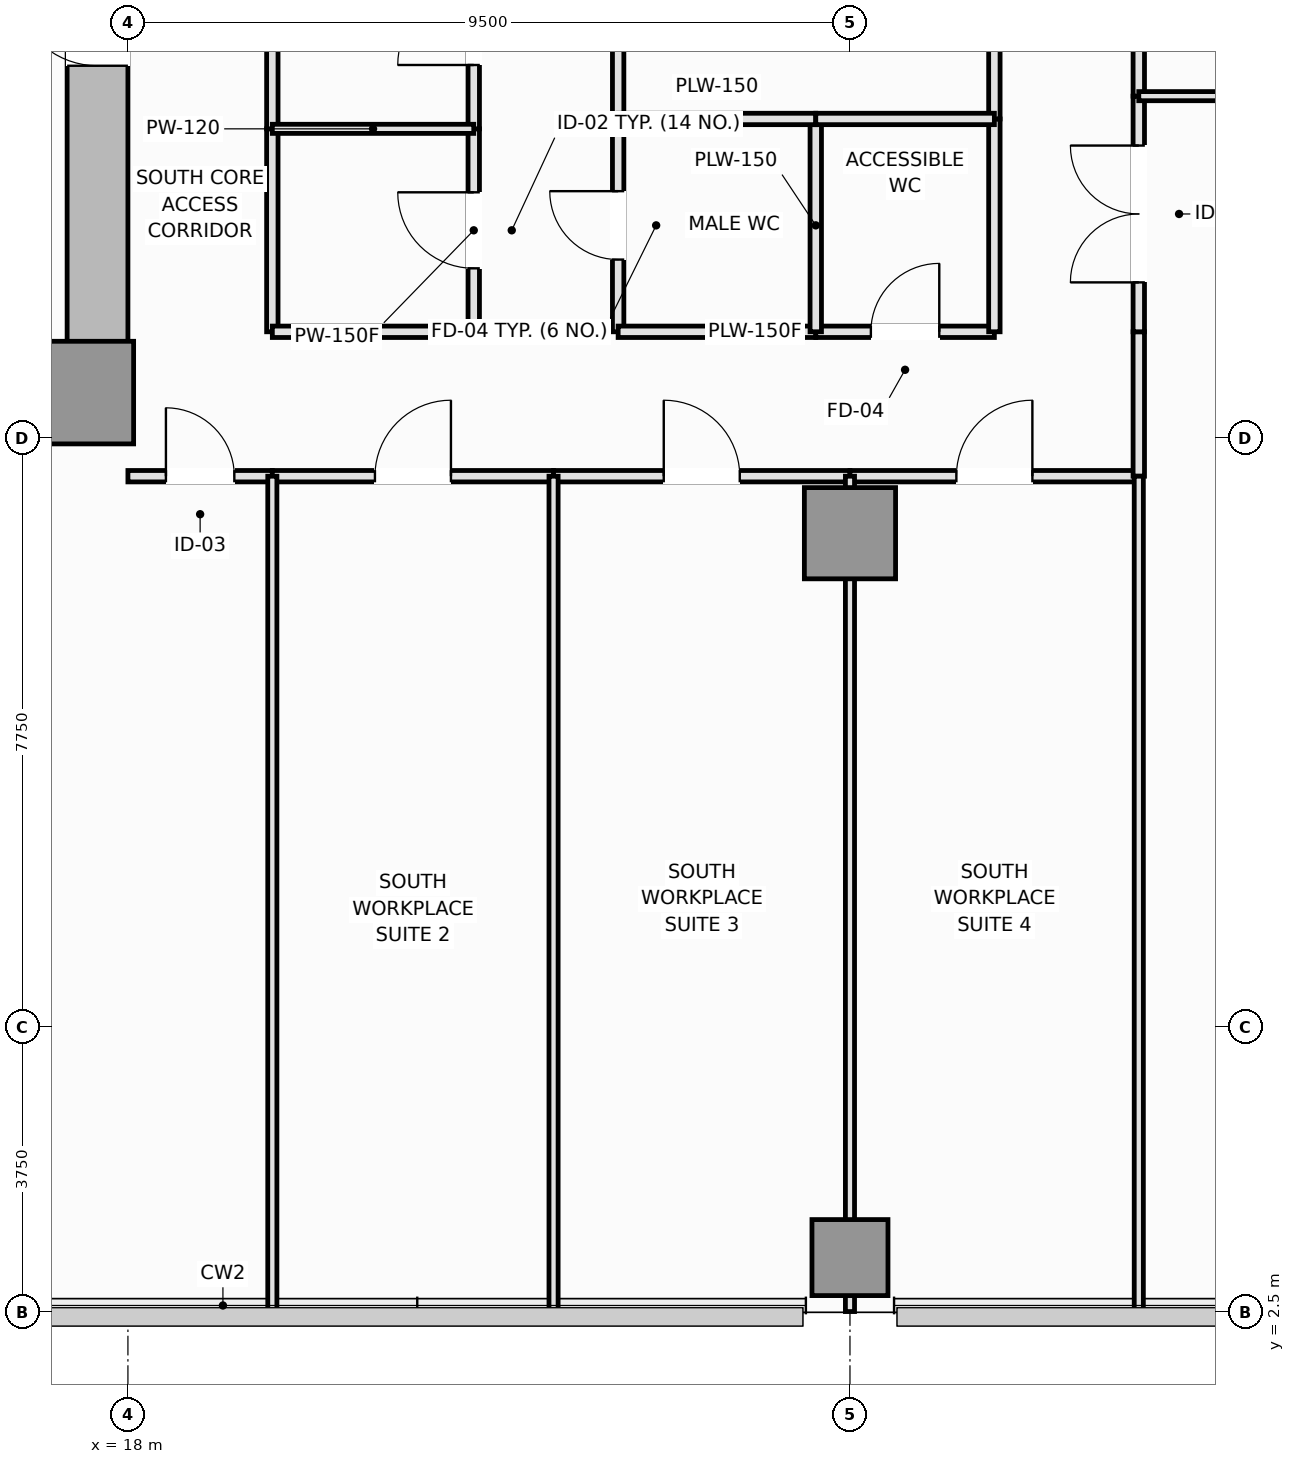
"""IFC4 building model, lengths in metres.
Left out: names, types, materials, properties, quantities, classifications, styles, units other than length and angle.
Written with IfcOpenShell. Run it as: python <this file> out.ifc"""

import sys

from ifc_helpers import new_model, si_unit, direction, frame, frame_2d, origin, origin_2d, place, context, subcontext, project, spatial, rectangle, extrude, element, fill, save


model = new_model("IFC4")
c1 = context("Model", 3, precision=1e-05, world=origin(), true_north=direction((0.0, 1.0)))
c2 = subcontext(c1, "Body", "Model", "MODEL_VIEW")
j1 = project(units=[si_unit("LENGTHUNIT", "METRE"), si_unit("PLANEANGLEUNIT", "RADIAN")], contexts=[c1])
p1 = place(None, origin())
s1 = spatial("IfcSite", under=j1, at=p1, CompositionType="ELEMENT")
p2 = place(p1, origin())
s2 = spatial("IfcBuilding", under=s1, at=p2, CompositionType="ELEMENT")
p3 = place(p2, frame((0.0, 0.0, 89.5)))
s3 = spatial("IfcBuildingStorey", under=s2, at=p3, CompositionType="ELEMENT", Elevation=89.5)
p4 = place(p3, frame((4.5, 14.4, 0.0), z_axis=(0.0, 0.0, 1.0), x_axis=(1.0, 0.0, 0.0)))
e1 = element("IfcWall", 1, at=p4, inside=s3, PredefinedType="SHEAR", context=c2, shape_type="SweptSolid", body=[
    extrude(rectangle(XDim=13.5, YDim=0.8, at=frame_2d((6.75, 0.0))), origin(), (0.0, 0.0, 1.0), 3.55),
])
p5 = place(p3, frame((17.6, 14.8, 0.0), z_axis=(0.0, 0.0, 1.0), x_axis=(0.0, 1.0, 0.0)))
e2 = element("IfcWall", 2, at=p5, inside=s3, PredefinedType="SHEAR", context=c2, shape_type="SweptSolid", body=[
    extrude(rectangle(XDim=8.65, YDim=0.8, at=frame_2d((4.325, 0.0))), origin(), (0.0, 0.0, 1.0), 3.55),
])
p6 = place(p5, frame((4.1, 0.0, 0.0)))
e3 = element("IfcOpeningElement", 3, at=p6, cuts=e2, PredefinedType="OPENING", context=c2, shape_type="SweptSolid", body=[
    extrude(rectangle(XDim=1.1, YDim=2.15, at=frame_2d((0.55, 1.075))), frame((0.0, 0.41, 0.0), z_axis=(0.0, -1.0, 0.0), x_axis=(1.0, 0.0, 0.0)), (0.0, 0.0, 1.0), 0.82),
])
p7 = place(p3, frame((17.4, 14.6, 0.0), z_axis=(0.0, 0.0, 1.0), x_axis=(1.0, 0.0, 0.0)))
e4 = element("IfcColumn", 4, at=p7, inside=s3, PredefinedType="PILASTER", context=c2, shape_type="SweptSolid", body=[
    extrude(rectangle(XDim=1.35, YDim=1.35, at=origin_2d()), origin(), (0.0, 0.0, 1.0), 3.55),
])
p8 = place(p3, frame((27.5, 12.75, 0.0), z_axis=(0.0, 0.0, 1.0), x_axis=(1.0, 0.0, 0.0)))
e5 = element("IfcColumn", 5, at=p8, inside=s3, PredefinedType="COLUMN", context=c2, shape_type="SweptSolid", body=[
    extrude(rectangle(XDim=1.2, YDim=1.2, at=origin_2d()), origin(), (0.0, 0.0, 1.0), 3.55),
])
p9 = place(p3, frame((27.5, 3.22, 0.0), z_axis=(0.0, 0.0, 1.0), x_axis=(1.0, 0.0, 0.0)))
e6 = element("IfcColumn", 6, at=p9, inside=s3, PredefinedType="COLUMN", context=c2, shape_type="SweptSolid", body=[
    extrude(rectangle(XDim=1.0, YDim=1.0, at=origin_2d()), origin(), (0.0, 0.0, 1.0), 3.55),
])
p10 = place(p3, frame((22.55, 15.4, 0.0), z_axis=(0.0, 0.0, 1.0), x_axis=(0.0, 1.0, 0.0)))
e7 = element("IfcWall", 7, at=p10, inside=s3, PredefinedType="PARTITIONING", context=c2, shape_type="SweptSolid", body=[
    extrude(rectangle(XDim=2.67, YDim=0.15, at=frame_2d((1.335, 0.0))), origin(), (0.0, 0.0, 1.0), 2.99),
])
p11 = place(p10, frame((0.835, 0.0, 0.0)))
e8 = element("IfcOpeningElement", 8, at=p11, cuts=e7, PredefinedType="OPENING", context=c2, shape_type="SweptSolid", body=[
    extrude(rectangle(XDim=1.0, YDim=2.15, at=frame_2d((0.5, 1.075))), frame((0.0, 0.085, 0.0), z_axis=(0.0, -1.0, 0.0), x_axis=(1.0, 0.0, 0.0)), (0.0, 0.0, 1.0), 0.17),
])
p12 = place(p3, frame((22.55, 18.07, 0.0), z_axis=(0.0, 0.0, 1.0), x_axis=(0.0, 1.0, 0.0)))
e9 = element("IfcWall", 9, at=p12, inside=s3, PredefinedType="PARTITIONING", context=c2, shape_type="SweptSolid", body=[
    extrude(rectangle(XDim=2.68, YDim=0.15, at=frame_2d((1.34, 0.0))), origin(), (0.0, 0.0, 1.0), 2.99),
])
p13 = place(p12, frame((0.84, 0.0, 0.0)))
e10 = element("IfcOpeningElement", 10, at=p13, cuts=e9, PredefinedType="OPENING", context=c2, shape_type="SweptSolid", body=[
    extrude(rectangle(XDim=1.0, YDim=2.15, at=frame_2d((0.5, 1.075))), frame((0.0, 0.085, 0.0), z_axis=(0.0, -1.0, 0.0), x_axis=(1.0, 0.0, 0.0)), (0.0, 0.0, 1.0), 0.17),
])
p14 = place(p3, frame((24.45, 15.4, 0.0), z_axis=(0.0, 0.0, 1.0), x_axis=(0.0, 1.0, 0.0)))
e11 = element("IfcWall", 11, at=p14, inside=s3, PredefinedType="PLUMBINGWALL", context=c2, shape_type="SweptSolid", body=[
    extrude(rectangle(XDim=2.8, YDim=0.15, at=frame_2d((1.4, 0.0))), origin(), (0.0, 0.0, 1.0), 3.35),
])
p15 = place(p14, frame((0.95, 0.0, 0.0)))
e12 = element("IfcOpeningElement", 12, at=p15, cuts=e11, PredefinedType="OPENING", context=c2, shape_type="SweptSolid", body=[
    extrude(rectangle(XDim=0.9, YDim=2.1, at=frame_2d((0.45, 1.05))), frame((0.0, 0.085, 0.0), z_axis=(0.0, -1.0, 0.0), x_axis=(1.0, 0.0, 0.0)), (0.0, 0.0, 1.0), 0.17),
])
p16 = place(p3, frame((24.45, 18.2, 0.0), z_axis=(0.0, 0.0, 1.0), x_axis=(0.0, 1.0, 0.0)))
e13 = element("IfcWall", 13, at=p16, inside=s3, PredefinedType="PARTITIONING", context=c2, shape_type="SweptSolid", body=[
    extrude(rectangle(XDim=3.0, YDim=0.15, at=frame_2d((1.5, 0.0))), origin(), (0.0, 0.0, 1.0), 3.35),
])
p17 = place(p16, frame((1.0, 0.0, 0.0)))
e14 = element("IfcOpeningElement", 14, at=p17, cuts=e13, PredefinedType="OPENING", context=c2, shape_type="SweptSolid", body=[
    extrude(rectangle(XDim=1.0, YDim=2.15, at=frame_2d((0.5, 1.075))), frame((0.0, 0.085, 0.0), z_axis=(0.0, -1.0, 0.0), x_axis=(1.0, 0.0, 0.0)), (0.0, 0.0, 1.0), 0.17),
])
p18 = place(p3, frame((19.9, 15.4, 0.0), z_axis=(0.0, 0.0, 1.0), x_axis=(0.0, 1.0, 0.0)))
e15 = element("IfcWall", 15, at=p18, inside=s3, PredefinedType="PARTITIONING", context=c2, shape_type="SweptSolid", body=[
    extrude(rectangle(XDim=2.67, YDim=0.15, at=frame_2d((1.335, 0.0))), origin(), (0.0, 0.0, 1.0), 3.35),
])
p19 = place(p3, frame((19.9, 18.07, 0.0), z_axis=(0.0, 0.0, 1.0), x_axis=(0.0, 1.0, 0.0)))
e16 = element("IfcWall", 16, at=p19, inside=s3, PredefinedType="PARTITIONING", context=c2, shape_type="SweptSolid", body=[
    extrude(rectangle(XDim=2.68, YDim=0.15, at=frame_2d((1.34, 0.0))), origin(), (0.0, 0.0, 1.0), 3.35),
])
p20 = place(p3, frame((19.9, 15.4, 0.0), z_axis=(0.0, 0.0, 1.0), x_axis=(1.0, 0.0, 0.0)))
e17 = element("IfcWall", 17, at=p20, inside=s3, PredefinedType="PARTITIONING", context=c2, shape_type="SweptSolid", body=[
    extrude(rectangle(XDim=2.65, YDim=0.15, at=frame_2d((1.325, 0.0))), origin(), (0.0, 0.0, 1.0), 3.35),
])
p21 = place(p3, frame((24.45, 15.4, 0.0), z_axis=(0.0, 0.0, 1.0), x_axis=(1.0, 0.0, 0.0)))
e18 = element("IfcWall", 18, at=p21, inside=s3, PredefinedType="PLUMBINGWALL", context=c2, shape_type="SweptSolid", body=[
    extrude(rectangle(XDim=2.6, YDim=0.15, at=frame_2d((1.3, 0.0))), origin(), (0.0, 0.0, 1.0), 3.35),
])
p22 = place(p3, frame((27.05, 15.4, 0.0), z_axis=(0.0, 0.0, 1.0), x_axis=(1.0, 0.0, 0.0)))
e19 = element("IfcWall", 19, at=p22, inside=s3, PredefinedType="PLUMBINGWALL", context=c2, shape_type="SweptSolid", body=[
    extrude(rectangle(XDim=2.35, YDim=0.15, at=frame_2d((1.175, 0.0))), origin(), (0.0, 0.0, 1.0), 3.35),
])
p23 = place(p22, frame((0.725, 0.0, 0.0)))
e20 = element("IfcOpeningElement", 20, at=p23, cuts=e19, PredefinedType="OPENING", context=c2, shape_type="SweptSolid", body=[
    extrude(rectangle(XDim=0.9, YDim=2.1, at=frame_2d((0.45, 1.05))), frame((0.0, 0.085, 0.0), z_axis=(0.0, -1.0, 0.0), x_axis=(1.0, 0.0, 0.0)), (0.0, 0.0, 1.0), 0.17),
])
p24 = place(p3, frame((18.0, 13.5, 0.0), z_axis=(0.0, 0.0, 1.0), x_axis=(1.0, 0.0, 0.0)))
e21 = element("IfcWall", 21, at=p24, inside=s3, PredefinedType="PARTITIONING", context=c2, shape_type="SweptSolid", body=[
    extrude(rectangle(XDim=1.9, YDim=0.15, at=frame_2d((0.95, 0.0))), origin(), (0.0, 0.0, 1.0), 3.35),
])
p25 = place(p24, frame((0.5, 0.0, 0.0)))
e22 = element("IfcOpeningElement", 22, at=p25, cuts=e21, PredefinedType="OPENING", context=c2, shape_type="SweptSolid", body=[
    extrude(rectangle(XDim=0.9, YDim=2.1, at=frame_2d((0.45, 1.05))), frame((0.0, 0.085, 0.0), z_axis=(0.0, -1.0, 0.0), x_axis=(1.0, 0.0, 0.0)), (0.0, 0.0, 1.0), 0.17),
])
p26 = place(p3, frame((19.9, 13.5, 0.0), z_axis=(0.0, 0.0, 1.0), x_axis=(1.0, 0.0, 0.0)))
e23 = element("IfcWall", 23, at=p26, inside=s3, PredefinedType="PARTITIONING", context=c2, shape_type="SweptSolid", body=[
    extrude(rectangle(XDim=3.7, YDim=0.15, at=frame_2d((1.85, 0.0))), origin(), (0.0, 0.0, 1.0), 3.35),
])
p27 = place(p26, frame((1.35, 0.0, 0.0)))
e24 = element("IfcOpeningElement", 24, at=p27, cuts=e23, PredefinedType="OPENING", context=c2, shape_type="SweptSolid", body=[
    extrude(rectangle(XDim=1.0, YDim=2.15, at=frame_2d((0.5, 1.075))), frame((0.0, 0.085, 0.0), z_axis=(0.0, -1.0, 0.0), x_axis=(1.0, 0.0, 0.0)), (0.0, 0.0, 1.0), 0.17),
])
p28 = place(p3, frame((23.6, 13.5, 0.0), z_axis=(0.0, 0.0, 1.0), x_axis=(1.0, 0.0, 0.0)))
e25 = element("IfcWall", 25, at=p28, inside=s3, PredefinedType="PARTITIONING", context=c2, shape_type="SweptSolid", body=[
    extrude(rectangle(XDim=3.9, YDim=0.15, at=frame_2d((1.95, 0.0))), origin(), (0.0, 0.0, 1.0), 3.35),
])
p29 = place(p28, frame((1.45, 0.0, 0.0)))
e26 = element("IfcOpeningElement", 26, at=p29, cuts=e25, PredefinedType="OPENING", context=c2, shape_type="SweptSolid", body=[
    extrude(rectangle(XDim=1.0, YDim=2.15, at=frame_2d((0.5, 1.075))), frame((0.0, 0.085, 0.0), z_axis=(0.0, -1.0, 0.0), x_axis=(1.0, 0.0, 0.0)), (0.0, 0.0, 1.0), 0.17),
])
p30 = place(p3, frame((27.5, 13.5, 0.0), z_axis=(0.0, 0.0, 1.0), x_axis=(1.0, 0.0, 0.0)))
e27 = element("IfcWall", 27, at=p30, inside=s3, PredefinedType="PARTITIONING", context=c2, shape_type="SweptSolid", body=[
    extrude(rectangle(XDim=3.8, YDim=0.15, at=frame_2d((1.9, 0.0))), origin(), (0.0, 0.0, 1.0), 3.35),
])
p31 = place(p30, frame((1.4, 0.0, 0.0)))
e28 = element("IfcOpeningElement", 28, at=p31, cuts=e27, PredefinedType="OPENING", context=c2, shape_type="SweptSolid", body=[
    extrude(rectangle(XDim=1.0, YDim=2.15, at=frame_2d((0.5, 1.075))), frame((0.0, 0.085, 0.0), z_axis=(0.0, -1.0, 0.0), x_axis=(1.0, 0.0, 0.0)), (0.0, 0.0, 1.0), 0.17),
])
p32 = place(p3, frame((31.3, 13.5, 0.0), z_axis=(0.0, 0.0, 1.0), x_axis=(0.0, 1.0, 0.0)))
e29 = element("IfcWall", 29, at=p32, inside=s3, PredefinedType="PARTITIONING", context=c2, shape_type="SweptSolid", body=[
    extrude(rectangle(XDim=1.9, YDim=0.15, at=frame_2d((0.95, 0.0))), origin(), (0.0, 0.0, 1.0), 3.35),
])
p33 = place(p3, frame((29.4, 15.4, 0.0), z_axis=(0.0, 0.0, 1.0), x_axis=(0.0, 1.0, 0.0)))
e30 = element("IfcWall", 30, at=p33, inside=s3, PredefinedType="PLUMBINGWALL", context=c2, shape_type="SweptSolid", body=[
    extrude(rectangle(XDim=2.8, YDim=0.15, at=frame_2d((1.4, 0.0))), origin(), (0.0, 0.0, 1.0), 3.35),
])
p34 = place(p3, frame((29.4, 18.2, 0.0), z_axis=(0.0, 0.0, 1.0), x_axis=(0.0, 1.0, 0.0)))
e31 = element("IfcWall", 31, at=p34, inside=s3, PredefinedType="PARTITIONING", context=c2, shape_type="SweptSolid", body=[
    extrude(rectangle(XDim=3.0, YDim=0.15, at=frame_2d((1.5, 0.0))), origin(), (0.0, 0.0, 1.0), 3.35),
])
p35 = place(p3, frame((31.3, 15.4, 0.0), z_axis=(0.0, 0.0, 1.0), x_axis=(0.0, 1.0, 0.0)))
e32 = element("IfcWall", 32, at=p35, inside=s3, PredefinedType="PARTITIONING", context=c2, shape_type="SweptSolid", body=[
    extrude(rectangle(XDim=3.1, YDim=0.15, at=frame_2d((1.55, 0.0))), origin(), (0.0, 0.0, 1.0), 3.35),
])
p36 = place(p35, frame((0.65, 0.0, 0.0)))
e33 = element("IfcOpeningElement", 33, at=p36, cuts=e32, PredefinedType="OPENING", context=c2, shape_type="SweptSolid", body=[
    extrude(rectangle(XDim=1.8, YDim=2.2, at=frame_2d((0.9, 1.1))), frame((0.0, 0.085, 0.0), z_axis=(0.0, -1.0, 0.0), x_axis=(1.0, 0.0, 0.0)), (0.0, 0.0, 1.0), 0.17),
])
p37 = place(p3, frame((31.3, 18.5, 0.0), z_axis=(0.0, 0.0, 1.0), x_axis=(0.0, 1.0, 0.0)))
e34 = element("IfcWall", 34, at=p37, inside=s3, PredefinedType="PARTITIONING", context=c2, shape_type="SweptSolid", body=[
    extrude(rectangle(XDim=16.6, YDim=0.15, at=frame_2d((8.3, 0.0))), origin(), (0.0, 0.0, 1.0), 3.35),
])
p38 = place(p37, frame((7.4, 0.0, 0.0)))
e35 = element("IfcOpeningElement", 35, at=p38, cuts=e34, PredefinedType="OPENING", context=c2, shape_type="SweptSolid", body=[
    extrude(rectangle(XDim=1.8, YDim=2.2, at=frame_2d((0.9, 1.1))), frame((0.0, 0.085, 0.0), z_axis=(0.0, -1.0, 0.0), x_axis=(1.0, 0.0, 0.0)), (0.0, 0.0, 1.0), 0.17),
])
p39 = place(p3, frame((19.9, 18.07, 0.0), z_axis=(0.0, 0.0, 1.0), x_axis=(1.0, 0.0, 0.0)))
e36 = element("IfcWall", 36, at=p39, inside=s3, PredefinedType="PARTITIONING", context=c2, shape_type="SweptSolid", body=[
    extrude(rectangle(XDim=2.65, YDim=0.12, at=frame_2d((1.325, 0.0))), origin(), (0.0, 0.0, 1.0), 3.35),
])
p40 = place(p3, frame((27.05, 15.4, 0.0), z_axis=(0.0, 0.0, 1.0), x_axis=(0.0, 1.0, 0.0)))
e37 = element("IfcWall", 37, at=p40, inside=s3, PredefinedType="PLUMBINGWALL", context=c2, shape_type="SweptSolid", body=[
    extrude(rectangle(XDim=2.8, YDim=0.15, at=frame_2d((1.4, 0.0))), origin(), (0.0, 0.0, 1.0), 3.35),
])
p41 = place(p3, frame((24.45, 18.2, 0.0), z_axis=(0.0, 0.0, 1.0), x_axis=(1.0, 0.0, 0.0)))
e38 = element("IfcWall", 38, at=p41, inside=s3, PredefinedType="PLUMBINGWALL", context=c2, shape_type="SweptSolid", body=[
    extrude(rectangle(XDim=2.6, YDim=0.15, at=frame_2d((1.3, 0.0))), origin(), (0.0, 0.0, 1.0), 3.35),
])
p42 = place(p3, frame((27.05, 18.2, 0.0), z_axis=(0.0, 0.0, 1.0), x_axis=(1.0, 0.0, 0.0)))
e39 = element("IfcWall", 39, at=p42, inside=s3, PredefinedType="PLUMBINGWALL", context=c2, shape_type="SweptSolid", body=[
    extrude(rectangle(XDim=2.35, YDim=0.15, at=frame_2d((1.175, 0.0))), origin(), (0.0, 0.0, 1.0), 3.35),
])
for number, where, z_axis, x_axis in (
    (40, (19.9, 2.51, 0.0), (0.0, 0.0, 1.0), (0.0, 1.0, 0.0)),
    (41, (23.6, 2.51, 0.0), (0.0, 0.0, 1.0), (0.0, 1.0, 0.0)),
):
    element("IfcWall", number, at=place(p3, frame(where, z_axis=z_axis, x_axis=x_axis)), inside=s3, PredefinedType="PARTITIONING", context=c2, shape_type="SweptSolid", body=[
        extrude(rectangle(XDim=10.99, YDim=0.12, at=frame_2d((5.495, 0.0))), origin(), (0.0, 0.0, 1.0), 3.35),
    ])
p43 = place(p3, frame((27.5, 2.51, 0.0), z_axis=(0.0, 0.0, 1.0), x_axis=(0.0, 1.0, 0.0)))
e42 = element("IfcWall", 42, at=p43, inside=s3, PredefinedType="PARTITIONING", context=c2, shape_type="SweptSolid", body=[
    extrude(rectangle(XDim=10.99, YDim=0.12, at=frame_2d((5.495, 0.0))), origin(), (0.0, 0.0, 1.0), 2.8),
])
p44 = place(p3, frame((31.3, 2.51, 0.0), z_axis=(0.0, 0.0, 1.0), x_axis=(0.0, 1.0, 0.0)))
e43 = element("IfcWall", 43, at=p44, inside=s3, PredefinedType="PARTITIONING", context=c2, shape_type="SweptSolid", body=[
    extrude(rectangle(XDim=10.99, YDim=0.12, at=frame_2d((5.495, 0.0))), origin(), (0.0, 0.0, 1.0), 3.35),
])
p45 = place(p3, frame((31.3, 18.5, 0.0), z_axis=(0.0, 0.0, 1.0), x_axis=(1.0, 0.0, 0.0)))
e44 = element("IfcWall", 44, at=p45, inside=s3, PredefinedType="PARTITIONING", context=c2, shape_type="SweptSolid", body=[
    extrude(rectangle(XDim=22.19, YDim=0.12, at=frame_2d((11.095, 0.0))), origin(), (0.0, 0.0, 1.0), 2.7),
])
p46 = place(p6, origin())
e45 = element("IfcDoor", 45, at=p46, inside=s3, OperationType="SINGLE_SWING_RIGHT", PredefinedType="DOOR", context=c2, shape_type="SweptSolid", body=[
    extrude(rectangle(XDim=1.1, YDim=2.15, at=frame_2d((0.55, 1.075))), frame((0.0, 0.025, 0.0), z_axis=(0.0, -1.0, 0.0), x_axis=(1.0, 0.0, 0.0)), (0.0, 0.0, 1.0), 0.05),
])
fill(e3, e45)
p47 = place(p11, origin())
e46 = element("IfcDoor", 46, at=p47, inside=s3, OperationType="SINGLE_SWING_RIGHT", PredefinedType="DOOR", context=c2, shape_type="SweptSolid", body=[
    extrude(rectangle(XDim=1.0, YDim=2.15, at=frame_2d((0.5, 1.075))), frame((0.0, 0.025, 0.0), z_axis=(0.0, -1.0, 0.0), x_axis=(1.0, 0.0, 0.0)), (0.0, 0.0, 1.0), 0.05),
])
fill(e8, e46)
p48 = place(p13, origin())
e47 = element("IfcDoor", 47, at=p48, inside=s3, OperationType="SINGLE_SWING_LEFT", PredefinedType="DOOR", context=c2, shape_type="SweptSolid", body=[
    extrude(rectangle(XDim=1.0, YDim=2.15, at=frame_2d((0.5, 1.075))), frame((0.0, 0.025, 0.0), z_axis=(0.0, -1.0, 0.0), x_axis=(1.0, 0.0, 0.0)), (0.0, 0.0, 1.0), 0.05),
])
fill(e10, e47)
p49 = place(p15, origin())
e48 = element("IfcDoor", 48, at=p49, inside=s3, OperationType="SINGLE_SWING_RIGHT", PredefinedType="DOOR", context=c2, shape_type="SweptSolid", body=[
    extrude(rectangle(XDim=0.9, YDim=2.1, at=frame_2d((0.45, 1.05))), frame((0.0, 0.025, 0.0), z_axis=(0.0, -1.0, 0.0), x_axis=(1.0, 0.0, 0.0)), (0.0, 0.0, 1.0), 0.05),
])
fill(e12, e48)
p50 = place(p23, origin())
e49 = element("IfcDoor", 49, at=p50, inside=s3, OperationType="SINGLE_SWING_RIGHT", PredefinedType="DOOR", context=c2, shape_type="SweptSolid", body=[
    extrude(rectangle(XDim=0.9, YDim=2.1, at=frame_2d((0.45, 1.05))), frame((0.0, 0.025, 0.0), z_axis=(0.0, -1.0, 0.0), x_axis=(1.0, 0.0, 0.0)), (0.0, 0.0, 1.0), 0.05),
])
fill(e20, e49)
p51 = place(p25, origin())
e50 = element("IfcDoor", 50, at=p51, inside=s3, OperationType="SINGLE_SWING_LEFT", PredefinedType="DOOR", context=c2, shape_type="SweptSolid", body=[
    extrude(rectangle(XDim=0.9, YDim=2.1, at=frame_2d((0.45, 1.05))), frame((0.0, 0.025, 0.0), z_axis=(0.0, -1.0, 0.0), x_axis=(1.0, 0.0, 0.0)), (0.0, 0.0, 1.0), 0.05),
])
fill(e22, e50)
p52 = place(p27, origin())
e51 = element("IfcDoor", 51, at=p52, inside=s3, OperationType="SINGLE_SWING_RIGHT", PredefinedType="DOOR", context=c2, shape_type="SweptSolid", body=[
    extrude(rectangle(XDim=1.0, YDim=2.15, at=frame_2d((0.5, 1.075))), frame((0.0, 0.025, 0.0), z_axis=(0.0, -1.0, 0.0), x_axis=(1.0, 0.0, 0.0)), (0.0, 0.0, 1.0), 0.05),
])
fill(e24, e51)
p53 = place(p29, origin())
e52 = element("IfcDoor", 52, at=p53, inside=s3, OperationType="SINGLE_SWING_LEFT", PredefinedType="DOOR", context=c2, shape_type="SweptSolid", body=[
    extrude(rectangle(XDim=1.0, YDim=2.15, at=frame_2d((0.5, 1.075))), frame((0.0, 0.025, 0.0), z_axis=(0.0, -1.0, 0.0), x_axis=(1.0, 0.0, 0.0)), (0.0, 0.0, 1.0), 0.05),
])
fill(e26, e52)
p54 = place(p31, origin())
e53 = element("IfcDoor", 53, at=p54, inside=s3, OperationType="SINGLE_SWING_RIGHT", PredefinedType="DOOR", context=c2, shape_type="SweptSolid", body=[
    extrude(rectangle(XDim=1.0, YDim=2.15, at=frame_2d((0.5, 1.075))), frame((0.0, 0.025, 0.0), z_axis=(0.0, -1.0, 0.0), x_axis=(1.0, 0.0, 0.0)), (0.0, 0.0, 1.0), 0.05),
])
fill(e28, e53)
p55 = place(p36, origin())
e54 = element("IfcDoor", 54, at=p55, inside=s3, OperationType="DOUBLE_DOOR_SINGLE_SWING", PredefinedType="DOOR", context=c2, shape_type="SweptSolid", body=[
    extrude(rectangle(XDim=1.8, YDim=2.2, at=frame_2d((0.9, 1.1))), frame((0.0, 0.025, 0.0), z_axis=(0.0, -1.0, 0.0), x_axis=(1.0, 0.0, 0.0)), (0.0, 0.0, 1.0), 0.05),
])
fill(e33, e54)
save(model, sys.argv[1])
